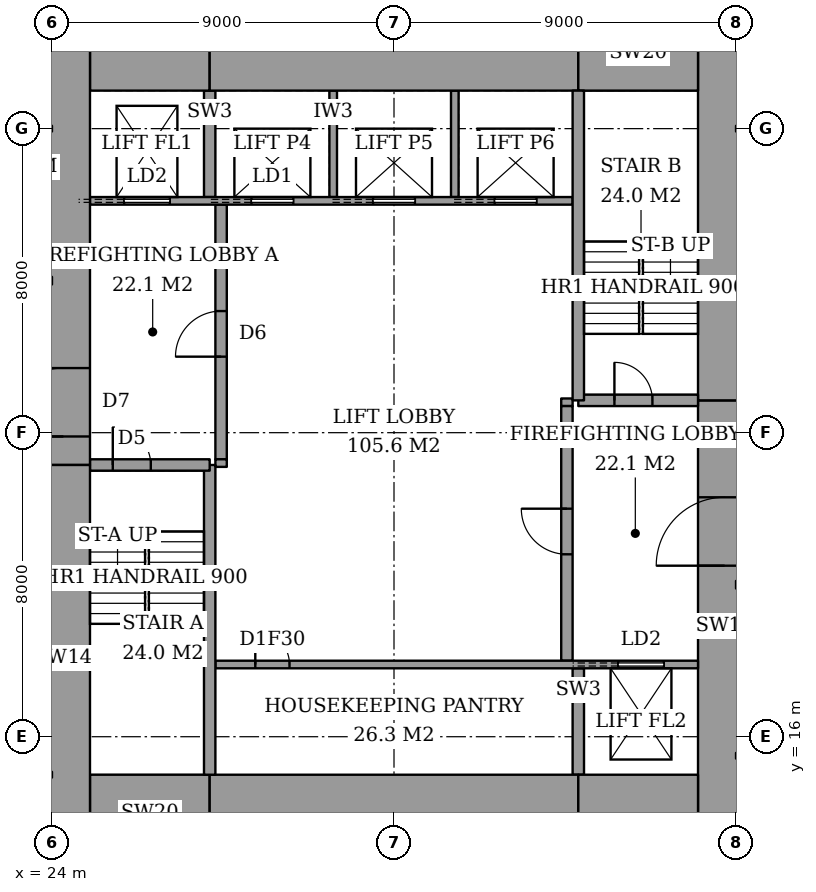
"""IFC4 building model, lengths in metres.
Left out: names, types, materials, properties, quantities, classifications, styles, units other than length and angle.
Written with IfcOpenShell. Run it as: python <this file> out.ifc"""

import sys

from ifc_helpers import new_model, si_unit, direction, frame, frame_2d, origin, place, context, subcontext, project, spatial, rectangle, extrude, element, fill, save


model = new_model("IFC4")
c1 = context("Model", 3, precision=1e-05, world=origin(), true_north=direction((0.0, 1.0)))
c2 = subcontext(c1, "Body", "Model", "MODEL_VIEW")
j1 = project(units=[si_unit("LENGTHUNIT", "METRE"), si_unit("PLANEANGLEUNIT", "RADIAN")], contexts=[c1])
p1 = place(None, origin())
s1 = spatial("IfcSite", under=j1, at=p1, CompositionType="ELEMENT")
p2 = place(p1, origin())
s2 = spatial("IfcBuilding", under=s1, at=p2, CompositionType="ELEMENT")
p3 = place(p2, frame((0.0, 0.0, 189.4)))
s3 = spatial("IfcBuildingStorey", under=s2, at=p3, CompositionType="ELEMENT", Elevation=189.4)
p4 = place(p3, frame((25.0, 14.0, 0.0), z_axis=(0.0, 0.0, 1.0), x_axis=(1.0, 0.0, 0.0)))
e1 = element("IfcWall", 1, at=p4, inside=s3, PredefinedType="SHEAR", context=c2, shape_type="SweptSolid", body=[
    extrude(rectangle(XDim=3.15, YDim=2.0, at=frame_2d((1.575, 0.0))), origin(), (0.0, 0.0, 1.0), 3.6),
])
p5 = place(p3, frame((28.15, 14.0, 0.0), z_axis=(0.0, 0.0, 1.0), x_axis=(1.0, 0.0, 0.0)))
e2 = element("IfcWall", 2, at=p5, inside=s3, PredefinedType="SHEAR", context=c2, shape_type="SweptSolid", body=[
    extrude(rectangle(XDim=9.7, YDim=2.0, at=frame_2d((4.85, 0.0))), origin(), (0.0, 0.0, 1.0), 3.6),
])
for number, where, z_axis, x_axis in (
    (3, (37.85, 14.0, 0.0), (0.0, 0.0, 1.0), (1.0, 0.0, 0.0)),
    (4, (25.0, 34.0, 0.0), (0.0, 0.0, 1.0), (1.0, 0.0, 0.0)),
):
    element("IfcWall", number, at=place(p3, frame(where, z_axis=z_axis, x_axis=x_axis)), inside=s3, PredefinedType="SHEAR", context=c2, shape_type="SweptSolid", body=[
        extrude(rectangle(XDim=3.15, YDim=2.0, at=frame_2d((1.575, 0.0))), origin(), (0.0, 0.0, 1.0), 3.6),
    ])
p6 = place(p3, frame((28.15, 34.0, 0.0), z_axis=(0.0, 0.0, 1.0), x_axis=(1.0, 0.0, 0.0)))
e5 = element("IfcWall", 5, at=p6, inside=s3, PredefinedType="SHEAR", context=c2, shape_type="SweptSolid", body=[
    extrude(rectangle(XDim=9.7, YDim=2.0, at=frame_2d((4.85, 0.0))), origin(), (0.0, 0.0, 1.0), 3.6),
])
p7 = place(p3, frame((37.85, 34.0, 0.0), z_axis=(0.0, 0.0, 1.0), x_axis=(1.0, 0.0, 0.0)))
e6 = element("IfcWall", 6, at=p7, inside=s3, PredefinedType="SHEAR", context=c2, shape_type="SweptSolid", body=[
    extrude(rectangle(XDim=3.15, YDim=2.0, at=frame_2d((1.575, 0.0))), origin(), (0.0, 0.0, 1.0), 3.6),
])
p8 = place(p3, frame((24.3, 13.0, 0.0), z_axis=(0.0, 0.0, 1.0), x_axis=(0.0, 1.0, 0.0)))
e7 = element("IfcWall", 7, at=p8, inside=s3, PredefinedType="SHEAR", context=c2, shape_type="SweptSolid", body=[
    extrude(rectangle(XDim=10.15, YDim=1.4, at=frame_2d((5.075, 0.0))), origin(), (0.0, 0.0, 1.0), 3.6),
])
p9 = place(p3, frame((24.3, 23.15, 0.0), z_axis=(0.0, 0.0, 1.0), x_axis=(0.0, 1.0, 0.0)))
e8 = element("IfcWall", 8, at=p9, inside=s3, PredefinedType="SHEAR", context=c2, shape_type="SweptSolid", body=[
    extrude(rectangle(XDim=11.85, YDim=1.4, at=frame_2d((5.925, 0.0))), origin(), (0.0, 0.0, 1.0), 3.6),
])
p10 = place(p9, frame((0.75, 0.0, 0.0)))
e9 = element("IfcOpeningElement", 9, at=p10, cuts=e8, PredefinedType="OPENING", context=c2, shape_type="SweptSolid", body=[
    extrude(rectangle(XDim=1.8, YDim=2.4, at=frame_2d((0.9, 1.2))), frame((0.0, 0.71, 0.0), z_axis=(0.0, -1.0, 0.0), x_axis=(1.0, 0.0, 0.0)), (0.0, 0.0, 1.0), 1.42),
])
p11 = place(p3, frame((41.7, 13.0, 0.0), z_axis=(0.0, 0.0, 1.0), x_axis=(0.0, 1.0, 0.0)))
e10 = element("IfcWall", 10, at=p11, inside=s3, PredefinedType="SHEAR", context=c2, shape_type="SweptSolid", body=[
    extrude(rectangle(XDim=11.85, YDim=1.4, at=frame_2d((5.925, 0.0))), origin(), (0.0, 0.0, 1.0), 3.6),
])
p12 = place(p11, frame((7.5, 0.0, 0.0)))
e11 = element("IfcOpeningElement", 11, at=p12, cuts=e10, PredefinedType="OPENING", context=c2, shape_type="SweptSolid", body=[
    extrude(rectangle(XDim=1.8, YDim=2.4, at=frame_2d((0.9, 1.2))), frame((0.0, 0.71, 0.0), z_axis=(0.0, -1.0, 0.0), x_axis=(1.0, 0.0, 0.0)), (0.0, 0.0, 1.0), 1.42),
])
p13 = place(p3, frame((41.7, 24.85, 0.0), z_axis=(0.0, 0.0, 1.0), x_axis=(0.0, 1.0, 0.0)))
e12 = element("IfcWall", 12, at=p13, inside=s3, PredefinedType="SHEAR", context=c2, shape_type="SweptSolid", body=[
    extrude(rectangle(XDim=10.15, YDim=1.4, at=frame_2d((5.075, 0.0))), origin(), (0.0, 0.0, 1.0), 3.6),
])
p14 = place(p3, frame((28.15, 15.0, 0.0), z_axis=(0.0, 0.0, 1.0), x_axis=(0.0, 1.0, 0.0)))
e13 = element("IfcWall", 13, at=p14, inside=s3, PredefinedType="SHEAR", context=c2, shape_type="SweptSolid", body=[
    extrude(rectangle(XDim=8.15, YDim=0.3, at=frame_2d((4.075, 0.0))), origin(), (0.0, 0.0, 1.0), 3.6),
])
p15 = place(p3, frame((25.0, 23.15, 0.0), z_axis=(0.0, 0.0, 1.0), x_axis=(1.0, 0.0, 0.0)))
e14 = element("IfcWall", 14, at=p15, inside=s3, PredefinedType="SHEAR", context=c2, shape_type="SweptSolid", body=[
    extrude(rectangle(XDim=3.15, YDim=0.3, at=frame_2d((1.575, 0.0))), origin(), (0.0, 0.0, 1.0), 3.6),
])
p16 = place(p15, frame((0.6, 0.0, 0.0)))
e15 = element("IfcOpeningElement", 15, at=p16, cuts=e14, PredefinedType="OPENING", context=c2, shape_type="SweptSolid", body=[
    extrude(rectangle(XDim=1.0, YDim=2.1, at=frame_2d((0.5, 1.05))), frame((0.0, 0.16, 0.0), z_axis=(0.0, -1.0, 0.0), x_axis=(1.0, 0.0, 0.0)), (0.0, 0.0, 1.0), 0.32),
])
p17 = place(p3, frame((37.85, 24.85, 0.0), z_axis=(0.0, 0.0, 1.0), x_axis=(0.0, 1.0, 0.0)))
e16 = element("IfcWall", 16, at=p17, inside=s3, PredefinedType="SHEAR", context=c2, shape_type="SweptSolid", body=[
    extrude(rectangle(XDim=8.15, YDim=0.3, at=frame_2d((4.075, 0.0))), origin(), (0.0, 0.0, 1.0), 3.6),
])
p18 = place(p3, frame((37.85, 24.85, 0.0), z_axis=(0.0, 0.0, 1.0), x_axis=(1.0, 0.0, 0.0)))
e17 = element("IfcWall", 17, at=p18, inside=s3, PredefinedType="SHEAR", context=c2, shape_type="SweptSolid", body=[
    extrude(rectangle(XDim=3.15, YDim=0.3, at=frame_2d((1.575, 0.0))), origin(), (0.0, 0.0, 1.0), 3.6),
])
p19 = place(p18, frame((0.95, 0.0, 0.0)))
e18 = element("IfcOpeningElement", 18, at=p19, cuts=e17, PredefinedType="OPENING", context=c2, shape_type="SweptSolid", body=[
    extrude(rectangle(XDim=1.0, YDim=2.1, at=frame_2d((0.5, 1.05))), frame((0.0, 0.16, 0.0), z_axis=(0.0, -1.0, 0.0), x_axis=(1.0, 0.0, 0.0)), (0.0, 0.0, 1.0), 0.32),
])
p20 = place(p3, frame((28.45, 23.3, 0.0), z_axis=(0.0, 0.0, 1.0), x_axis=(0.0, 1.0, 0.0)))
e19 = element("IfcWall", 19, at=p20, inside=s3, PredefinedType="PARTITIONING", context=c2, shape_type="SweptSolid", body=[
    extrude(rectangle(XDim=6.7, YDim=0.3, at=frame_2d((3.35, 0.0))), origin(), (0.0, 0.0, 1.0), 3.6),
])
p21 = place(p20, frame((2.7, 0.0, 0.0)))
e20 = element("IfcOpeningElement", 20, at=p21, cuts=e19, PredefinedType="OPENING", context=c2, shape_type="SweptSolid", body=[
    extrude(rectangle(XDim=1.2, YDim=2.1, at=frame_2d((0.6, 1.05))), frame((0.0, 0.16, 0.0), z_axis=(0.0, -1.0, 0.0), x_axis=(1.0, 0.0, 0.0)), (0.0, 0.0, 1.0), 0.32),
])
p22 = place(p3, frame((37.55, 18.0, 0.0), z_axis=(0.0, 0.0, 1.0), x_axis=(0.0, 1.0, 0.0)))
e21 = element("IfcWall", 21, at=p22, inside=s3, PredefinedType="PARTITIONING", context=c2, shape_type="SweptSolid", body=[
    extrude(rectangle(XDim=6.7, YDim=0.3, at=frame_2d((3.35, 0.0))), origin(), (0.0, 0.0, 1.0), 3.6),
])
p23 = place(p22, frame((2.8, 0.0, 0.0)))
e22 = element("IfcOpeningElement", 22, at=p23, cuts=e21, PredefinedType="OPENING", context=c2, shape_type="SweptSolid", body=[
    extrude(rectangle(XDim=1.2, YDim=2.1, at=frame_2d((0.6, 1.05))), frame((0.0, 0.16, 0.0), z_axis=(0.0, -1.0, 0.0), x_axis=(1.0, 0.0, 0.0)), (0.0, 0.0, 1.0), 0.32),
])
p24 = place(p3, frame((28.3, 17.9, 0.0), z_axis=(0.0, 0.0, 1.0), x_axis=(1.0, 0.0, 0.0)))
e23 = element("IfcWall", 23, at=p24, inside=s3, PredefinedType="PARTITIONING", context=c2, shape_type="SweptSolid", body=[
    extrude(rectangle(XDim=12.7, YDim=0.2, at=frame_2d((6.35, 0.0))), origin(), (0.0, 0.0, 1.0), 3.6),
])
p25 = place(p24, frame((1.05, 0.0, 0.0)))
e24 = element("IfcOpeningElement", 24, at=p25, cuts=e23, PredefinedType="OPENING", context=c2, shape_type="SweptSolid", body=[
    extrude(rectangle(XDim=0.9, YDim=2.1, at=frame_2d((0.45, 1.05))), frame((0.0, 0.11, 0.0), z_axis=(0.0, -1.0, 0.0), x_axis=(1.0, 0.0, 0.0)), (0.0, 0.0, 1.0), 0.22),
])
p26 = place(p24, frame((10.6, 0.0, 0.0)))
e25 = element("IfcOpeningElement", 25, at=p26, cuts=e23, PredefinedType="OPENING", context=c2, shape_type="SweptSolid", body=[
    extrude(rectangle(XDim=1.2, YDim=2.1, at=frame_2d((0.6, 1.05))), frame((0.0, 0.11, 0.0), z_axis=(0.0, -1.0, 0.0), x_axis=(1.0, 0.0, 0.0)), (0.0, 0.0, 1.0), 0.22),
])
p27 = place(p3, frame((25.0, 30.1, 0.0), z_axis=(0.0, 0.0, 1.0), x_axis=(1.0, 0.0, 0.0)))
e26 = element("IfcWall", 26, at=p27, inside=s3, PredefinedType="PARTITIONING", context=c2, shape_type="SweptSolid", body=[
    extrude(rectangle(XDim=12.7, YDim=0.2, at=frame_2d((6.35, 0.0))), origin(), (0.0, 0.0, 1.0), 3.6),
])
p28 = place(p27, frame((4.25, 0.0, 0.0)))
e27 = element("IfcOpeningElement", 27, at=p28, cuts=e26, PredefinedType="OPENING", context=c2, shape_type="SweptSolid", body=[
    extrude(rectangle(XDim=1.1, YDim=2.1, at=frame_2d((0.55, 1.05))), frame((0.0, 0.11, 0.0), z_axis=(0.0, -1.0, 0.0), x_axis=(1.0, 0.0, 0.0)), (0.0, 0.0, 1.0), 0.22),
])
p29 = place(p27, frame((7.45, 0.0, 0.0)))
e28 = element("IfcOpeningElement", 28, at=p29, cuts=e26, PredefinedType="OPENING", context=c2, shape_type="SweptSolid", body=[
    extrude(rectangle(XDim=1.1, YDim=2.1, at=frame_2d((0.55, 1.05))), frame((0.0, 0.11, 0.0), z_axis=(0.0, -1.0, 0.0), x_axis=(1.0, 0.0, 0.0)), (0.0, 0.0, 1.0), 0.22),
])
p30 = place(p27, frame((10.65, 0.0, 0.0)))
e29 = element("IfcOpeningElement", 29, at=p30, cuts=e26, PredefinedType="OPENING", context=c2, shape_type="SweptSolid", body=[
    extrude(rectangle(XDim=1.1, YDim=2.1, at=frame_2d((0.55, 1.05))), frame((0.0, 0.11, 0.0), z_axis=(0.0, -1.0, 0.0), x_axis=(1.0, 0.0, 0.0)), (0.0, 0.0, 1.0), 0.22),
])
p31 = place(p27, frame((0.9, 0.0, 0.0)))
e30 = element("IfcOpeningElement", 30, at=p31, cuts=e26, PredefinedType="OPENING", context=c2, shape_type="SweptSolid", body=[
    extrude(rectangle(XDim=1.2, YDim=2.1, at=frame_2d((0.6, 1.05))), frame((0.0, 0.11, 0.0), z_axis=(0.0, -1.0, 0.0), x_axis=(1.0, 0.0, 0.0)), (0.0, 0.0, 1.0), 0.22),
])
p32 = place(p3, frame((37.85, 15.0, 0.0), z_axis=(0.0, 0.0, 1.0), x_axis=(0.0, 1.0, 0.0)))
e31 = element("IfcWall", 31, at=p32, inside=s3, PredefinedType="SHEAR", context=c2, shape_type="SweptSolid", body=[
    extrude(rectangle(XDim=2.8, YDim=0.3, at=frame_2d((1.4, 0.0))), origin(), (0.0, 0.0, 1.0), 3.6),
])
for number, where, z_axis, x_axis in (
    (32, (31.4, 30.2, 0.0), (0.0, 0.0, 1.0), (0.0, 1.0, 0.0)),
    (33, (34.6, 30.2, 0.0), (0.0, 0.0, 1.0), (0.0, 1.0, 0.0)),
):
    element("IfcWall", number, at=place(p3, frame(where, z_axis=z_axis, x_axis=x_axis)), inside=s3, PredefinedType="PARTITIONING", context=c2, shape_type="SweptSolid", body=[
        extrude(rectangle(XDim=2.8, YDim=0.2, at=frame_2d((1.4, 0.0))), origin(), (0.0, 0.0, 1.0), 3.6),
    ])
p33 = place(p3, frame((28.15, 30.2, 0.0), z_axis=(0.0, 0.0, 1.0), x_axis=(0.0, 1.0, 0.0)))
e34 = element("IfcWall", 34, at=p33, inside=s3, PredefinedType="SHEAR", context=c2, shape_type="SweptSolid", body=[
    extrude(rectangle(XDim=2.8, YDim=0.3, at=frame_2d((1.4, 0.0))), origin(), (0.0, 0.0, 1.0), 3.6),
])
for number, where, z_axis, x_axis in (
    (35, (28.3, 23.2, 0.0), (0.0, 0.0, 1.0), (1.0, 0.0, 0.0)),
    (36, (37.4, 24.8, 0.0), (0.0, 0.0, 1.0), (1.0, 0.0, 0.0)),
):
    element("IfcWall", number, at=place(p3, frame(where, z_axis=z_axis, x_axis=x_axis)), inside=s3, PredefinedType="PARTITIONING", context=c2, shape_type="SweptSolid", body=[
        extrude(rectangle(XDim=0.3, YDim=0.2, at=frame_2d((0.15, 0.0))), origin(), (0.0, 0.0, 1.0), 3.6),
    ])
p34 = place(p16, origin())
e37 = element("IfcDoor", 37, at=p34, inside=s3, OperationType="SINGLE_SWING_RIGHT", PredefinedType="DOOR", context=c2, shape_type="SweptSolid", body=[
    extrude(rectangle(XDim=1.0, YDim=2.1, at=frame_2d((0.5, 1.05))), frame((0.0, 0.025, 0.0), z_axis=(0.0, -1.0, 0.0), x_axis=(1.0, 0.0, 0.0)), (0.0, 0.0, 1.0), 0.05),
])
fill(e15, e37)
p35 = place(p19, origin())
e38 = element("IfcDoor", 38, at=p35, inside=s3, OperationType="SINGLE_SWING_RIGHT", PredefinedType="DOOR", context=c2, shape_type="SweptSolid", body=[
    extrude(rectangle(XDim=1.0, YDim=2.1, at=frame_2d((0.5, 1.05))), frame((0.0, 0.025, 0.0), z_axis=(0.0, -1.0, 0.0), x_axis=(1.0, 0.0, 0.0)), (0.0, 0.0, 1.0), 0.05),
])
fill(e18, e38)
p36 = place(p21, origin())
e39 = element("IfcDoor", 39, at=p36, inside=s3, OperationType="SINGLE_SWING_RIGHT", PredefinedType="DOOR", context=c2, shape_type="SweptSolid", body=[
    extrude(rectangle(XDim=1.2, YDim=2.1, at=frame_2d((0.6, 1.05))), frame((0.0, 0.025, 0.0), z_axis=(0.0, -1.0, 0.0), x_axis=(1.0, 0.0, 0.0)), (0.0, 0.0, 1.0), 0.05),
])
fill(e20, e39)
p37 = place(p23, origin())
e40 = element("IfcDoor", 40, at=p37, inside=s3, OperationType="SINGLE_SWING_LEFT", PredefinedType="DOOR", context=c2, shape_type="SweptSolid", body=[
    extrude(rectangle(XDim=1.2, YDim=2.1, at=frame_2d((0.6, 1.05))), frame((0.0, 0.025, 0.0), z_axis=(0.0, -1.0, 0.0), x_axis=(1.0, 0.0, 0.0)), (0.0, 0.0, 1.0), 0.05),
])
fill(e22, e40)
p38 = place(p10, origin())
e41 = element("IfcDoor", 41, at=p38, inside=s3, OperationType="DOUBLE_DOOR_DOUBLE_SWING", PredefinedType="DOOR", context=c2, shape_type="SweptSolid", body=[
    extrude(rectangle(XDim=1.8, YDim=2.4, at=frame_2d((0.9, 1.2))), frame((0.0, 0.025, 0.0), z_axis=(0.0, -1.0, 0.0), x_axis=(1.0, 0.0, 0.0)), (0.0, 0.0, 1.0), 0.05),
])
fill(e9, e41)
p39 = place(p12, origin())
e42 = element("IfcDoor", 42, at=p39, inside=s3, OperationType="DOUBLE_DOOR_DOUBLE_SWING", PredefinedType="DOOR", context=c2, shape_type="SweptSolid", body=[
    extrude(rectangle(XDim=1.8, YDim=2.4, at=frame_2d((0.9, 1.2))), frame((0.0, 0.025, 0.0), z_axis=(0.0, -1.0, 0.0), x_axis=(1.0, 0.0, 0.0)), (0.0, 0.0, 1.0), 0.05),
])
fill(e11, e42)
p40 = place(p25, origin())
e43 = element("IfcDoor", 43, at=p40, inside=s3, OperationType="SINGLE_SWING_RIGHT", PredefinedType="DOOR", context=c2, shape_type="SweptSolid", body=[
    extrude(rectangle(XDim=0.9, YDim=2.1, at=frame_2d((0.45, 1.05))), frame((0.0, 0.025, 0.0), z_axis=(0.0, -1.0, 0.0), x_axis=(1.0, 0.0, 0.0)), (0.0, 0.0, 1.0), 0.05),
])
fill(e24, e43)
p41 = place(p28, origin())
e44 = element("IfcDoor", 44, at=p41, inside=s3, OperationType="SLIDING_TO_LEFT", PredefinedType="DOOR", context=c2, shape_type="SweptSolid", body=[
    extrude(rectangle(XDim=1.1, YDim=2.1, at=frame_2d((0.55, 1.05))), frame((0.0, 0.025, 0.0), z_axis=(0.0, -1.0, 0.0), x_axis=(1.0, 0.0, 0.0)), (0.0, 0.0, 1.0), 0.05),
])
fill(e27, e44)
p42 = place(p29, origin())
e45 = element("IfcDoor", 45, at=p42, inside=s3, OperationType="SLIDING_TO_LEFT", PredefinedType="DOOR", context=c2, shape_type="SweptSolid", body=[
    extrude(rectangle(XDim=1.1, YDim=2.1, at=frame_2d((0.55, 1.05))), frame((0.0, 0.025, 0.0), z_axis=(0.0, -1.0, 0.0), x_axis=(1.0, 0.0, 0.0)), (0.0, 0.0, 1.0), 0.05),
])
fill(e28, e45)
p43 = place(p30, origin())
e46 = element("IfcDoor", 46, at=p43, inside=s3, OperationType="SLIDING_TO_LEFT", PredefinedType="DOOR", context=c2, shape_type="SweptSolid", body=[
    extrude(rectangle(XDim=1.1, YDim=2.1, at=frame_2d((0.55, 1.05))), frame((0.0, 0.025, 0.0), z_axis=(0.0, -1.0, 0.0), x_axis=(1.0, 0.0, 0.0)), (0.0, 0.0, 1.0), 0.05),
])
fill(e29, e46)
p44 = place(p31, origin())
e47 = element("IfcDoor", 47, at=p44, inside=s3, OperationType="SLIDING_TO_LEFT", PredefinedType="DOOR", context=c2, shape_type="SweptSolid", body=[
    extrude(rectangle(XDim=1.2, YDim=2.1, at=frame_2d((0.6, 1.05))), frame((0.0, 0.025, 0.0), z_axis=(0.0, -1.0, 0.0), x_axis=(1.0, 0.0, 0.0)), (0.0, 0.0, 1.0), 0.05),
])
fill(e30, e47)
p45 = place(p26, origin())
e48 = element("IfcDoor", 48, at=p45, inside=s3, OperationType="SLIDING_TO_LEFT", PredefinedType="DOOR", context=c2, shape_type="SweptSolid", body=[
    extrude(rectangle(XDim=1.2, YDim=2.1, at=frame_2d((0.6, 1.05))), frame((0.0, 0.025, 0.0), z_axis=(0.0, -1.0, 0.0), x_axis=(1.0, 0.0, 0.0)), (0.0, 0.0, 1.0), 0.05),
])
fill(e25, e48)
save(model, sys.argv[1])
